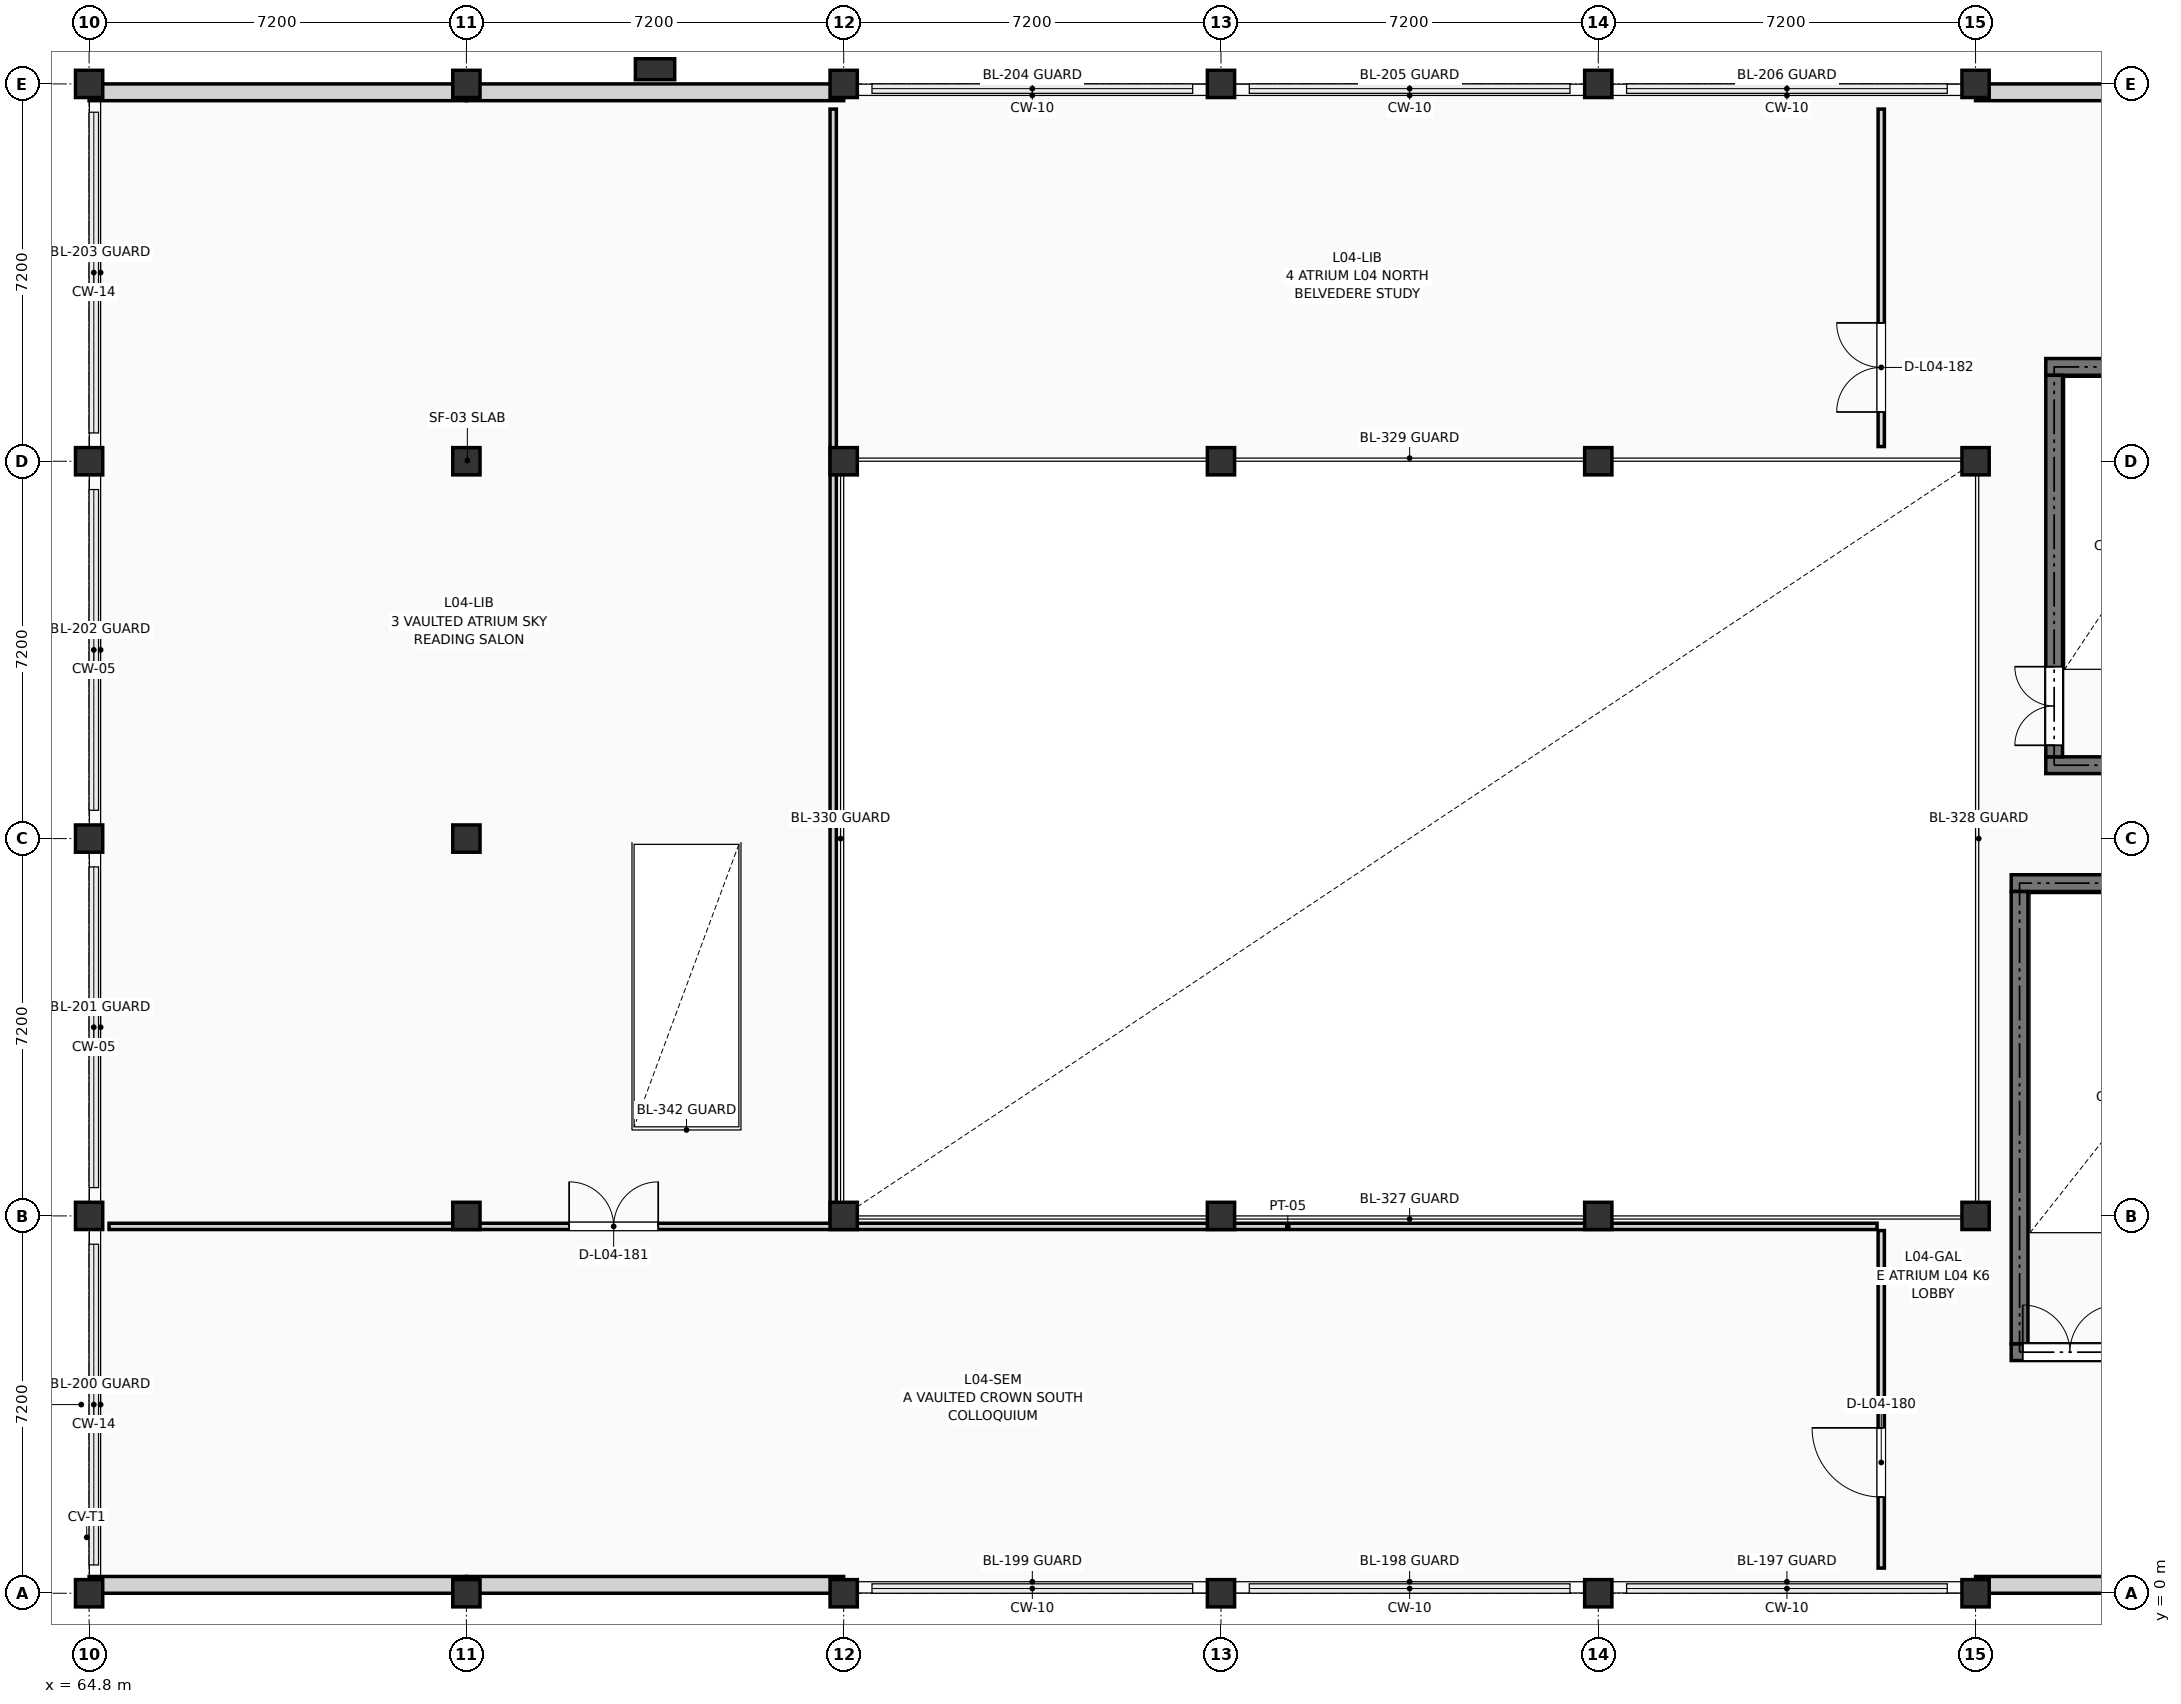
"""IFC4 building model, lengths in metres.
Left out: names, types, materials, properties, quantities, classifications, styles, units other than length and angle.
Written with IfcOpenShell. Run it as: python <this file> out.ifc"""

import sys

from ifc_helpers import new_model, si_unit, direction, frame, frame_2d, origin, origin_2d, place, context, subcontext, project, spatial, rectangle, extrude, element, fill, save


model = new_model("IFC4")
c1 = context("Model", 3, precision=1e-05, world=origin(), true_north=direction((0.0, 1.0)))
c2 = subcontext(c1, "Body", "Model", "MODEL_VIEW")
j1 = project(units=[si_unit("LENGTHUNIT", "METRE"), si_unit("PLANEANGLEUNIT", "RADIAN")], contexts=[c1])
p1 = place(None, origin())
s1 = spatial("IfcSite", under=j1, at=p1, CompositionType="ELEMENT")
p2 = place(p1, origin())
s2 = spatial("IfcBuilding", under=s1, at=p2, CompositionType="ELEMENT")
p3 = place(p2, frame((0.0, 0.0, 15.75)))
s3 = spatial("IfcBuildingStorey", under=s2, at=p3, CompositionType="ELEMENT", Elevation=15.75)
for number, where, z_axis, x_axis in (
    (1, (64.8, 0.0, 0.0), (0.0, 0.0, 1.0), (1.0, 0.0, 0.0)),
    (2, (64.8, 7.2, 0.0), (0.0, 0.0, 1.0), (1.0, 0.0, 0.0)),
    (3, (64.8, 14.4, 0.0), (0.0, 0.0, 1.0), (1.0, 0.0, 0.0)),
    (4, (64.8, 21.6, 0.0), (0.0, 0.0, 1.0), (1.0, 0.0, 0.0)),
    (5, (64.8, 28.8, 0.0), (0.0, 0.0, 1.0), (1.0, 0.0, 0.0)),
    (6, (72.0, 0.0, 0.0), (0.0, 0.0, 1.0), (1.0, 0.0, 0.0)),
    (7, (72.0, 7.2, 0.0), (0.0, 0.0, 1.0), (1.0, 0.0, 0.0)),
    (8, (72.0, 14.4, 0.0), (0.0, 0.0, 1.0), (1.0, 0.0, 0.0)),
    (9, (72.0, 21.6, 0.0), (0.0, 0.0, 1.0), (1.0, 0.0, 0.0)),
    (10, (72.0, 28.8, 0.0), (0.0, 0.0, 1.0), (1.0, 0.0, 0.0)),
    (11, (79.2, 0.0, 0.0), (0.0, 0.0, 1.0), (1.0, 0.0, 0.0)),
    (12, (79.2, 7.2, 0.0), (0.0, 0.0, 1.0), (1.0, 0.0, 0.0)),
    (13, (79.2, 21.6, 0.0), (0.0, 0.0, 1.0), (1.0, 0.0, 0.0)),
    (14, (79.2, 28.8, 0.0), (0.0, 0.0, 1.0), (1.0, 0.0, 0.0)),
    (15, (86.4, 0.0, 0.0), (0.0, 0.0, 1.0), (1.0, 0.0, 0.0)),
    (16, (86.4, 7.2, 0.0), (0.0, 0.0, 1.0), (1.0, 0.0, 0.0)),
    (17, (86.4, 21.6, 0.0), (0.0, 0.0, 1.0), (1.0, 0.0, 0.0)),
    (18, (86.4, 28.8, 0.0), (0.0, 0.0, 1.0), (1.0, 0.0, 0.0)),
    (19, (93.6, 0.0, 0.0), (0.0, 0.0, 1.0), (1.0, 0.0, 0.0)),
    (20, (93.6, 7.2, 0.0), (0.0, 0.0, 1.0), (1.0, 0.0, 0.0)),
    (21, (93.6, 21.6, 0.0), (0.0, 0.0, 1.0), (1.0, 0.0, 0.0)),
    (22, (93.6, 28.8, 0.0), (0.0, 0.0, 1.0), (1.0, 0.0, 0.0)),
    (23, (100.8, 0.0, 0.0), (0.0, 0.0, 1.0), (1.0, 0.0, 0.0)),
    (24, (100.8, 7.2, 0.0), (0.0, 0.0, 1.0), (1.0, 0.0, 0.0)),
    (25, (100.8, 21.6, 0.0), (0.0, 0.0, 1.0), (1.0, 0.0, 0.0)),
    (26, (100.8, 28.8, 0.0), (0.0, 0.0, 1.0), (1.0, 0.0, 0.0)),
):
    element("IfcColumn", number, at=place(p3, frame(where, z_axis=z_axis, x_axis=x_axis)), inside=s3, PredefinedType="COLUMN", context=c2, shape_type="SweptSolid", body=[
        extrude(rectangle(XDim=0.52, YDim=0.52, at=origin_2d()), origin(), (0.0, 0.0, 1.0), 3.6),
    ])
p4 = place(p3, frame((75.6, 29.08, 0.0), z_axis=(0.0, 0.0, 1.0), x_axis=(0.0, 1.0, 0.0)))
e27 = element("IfcColumn", 27, at=p4, inside=s3, PredefinedType="PILASTER", context=c2, shape_type="SweptSolid", body=[
    extrude(rectangle(XDim=0.4, YDim=0.75, at=origin_2d()), origin(), (0.0, 0.0, 1.0), 3.6),
])
for number, where, z_axis, x_axis in (
    (28, (100.8, 0.16, 0.0), (0.0, 0.0, 1.0), (1.0, 0.0, 0.0)),
    (29, (72.0, 0.16, 0.0), (0.0, 0.0, 1.0), (1.0, 0.0, 0.0)),
    (30, (64.8, 0.16, 0.0), (0.0, 0.0, 1.0), (1.0, 0.0, 0.0)),
    (31, (64.8, 28.64, 0.0), (0.0, 0.0, 1.0), (1.0, 0.0, 0.0)),
    (32, (72.0, 28.64, 0.0), (0.0, 0.0, 1.0), (1.0, 0.0, 0.0)),
    (33, (100.8, 28.64, 0.0), (0.0, 0.0, 1.0), (1.0, 0.0, 0.0)),
):
    element("IfcWall", number, at=place(p3, frame(where, z_axis=z_axis, x_axis=x_axis)), inside=s3, PredefinedType="SOLIDWALL", context=c2, shape_type="SweptSolid", body=[
        extrude(rectangle(XDim=7.2, YDim=0.32, at=frame_2d((3.6, 0.0))), origin(), (0.0, 0.0, 1.0), 2.84),
    ])
for number, where, z_axis, x_axis in (
    (34, (102.14, 15.8, 0.0), (0.0, 0.0, 1.0), (1.0, 0.0, 0.0)),
    (35, (102.14, 23.4, 0.0), (0.0, 0.0, 1.0), (1.0, 0.0, 0.0)),
):
    element("IfcWall", number, at=place(p3, frame(where, z_axis=z_axis, x_axis=x_axis)), inside=s3, PredefinedType="SHEAR", context=c2, shape_type="SweptSolid", body=[
        extrude(rectangle(XDim=4.44, YDim=0.32, at=frame_2d((2.22, 0.0))), origin(), (0.0, 0.0, 1.0), 3.39),
    ])
p5 = place(p3, frame((102.3, 15.96, 0.0), z_axis=(0.0, 0.0, 1.0), x_axis=(0.0, 1.0, 0.0)))
e36 = element("IfcWall", 36, at=p5, inside=s3, PredefinedType="SHEAR", context=c2, shape_type="SweptSolid", body=[
    extrude(rectangle(XDim=7.28, YDim=0.32, at=frame_2d((3.64, 0.0))), origin(), (0.0, 0.0, 1.0), 3.39),
])
p6 = place(p5, frame((0.22, 0.0, 0.0)))
e37 = element("IfcOpeningElement", 37, at=p6, cuts=e36, PredefinedType="OPENING", context=c2, shape_type="SweptSolid", body=[
    extrude(rectangle(XDim=1.5, YDim=2.2, at=frame_2d((0.75, 1.1))), frame((0.0, 0.172, 0.0), z_axis=(0.0, -1.0, 0.0), x_axis=(1.0, 0.0, 0.0)), (0.0, 0.0, 1.0), 0.344),
])
p7 = place(p3, frame((101.48, 4.6, 0.0), z_axis=(0.0, 0.0, 1.0), x_axis=(1.0, 0.0, 0.0)))
e38 = element("IfcWall", 38, at=p7, inside=s3, PredefinedType="SHEAR", context=c2, shape_type="SweptSolid", body=[
    extrude(rectangle(XDim=5.84, YDim=0.32, at=frame_2d((2.92, 0.0))), origin(), (0.0, 0.0, 1.0), 3.39),
])
p8 = place(p7, frame((0.22, 0.0, 0.0)))
e39 = element("IfcOpeningElement", 39, at=p8, cuts=e38, PredefinedType="OPENING", context=c2, shape_type="SweptSolid", body=[
    extrude(rectangle(XDim=1.8, YDim=2.2, at=frame_2d((0.9, 1.1))), frame((0.0, 0.172, 0.0), z_axis=(0.0, -1.0, 0.0), x_axis=(1.0, 0.0, 0.0)), (0.0, 0.0, 1.0), 0.344),
])
p9 = place(p3, frame((101.48, 13.55, 0.0), z_axis=(0.0, 0.0, 1.0), x_axis=(1.0, 0.0, 0.0)))
e40 = element("IfcWall", 40, at=p9, inside=s3, PredefinedType="SHEAR", context=c2, shape_type="SweptSolid", body=[
    extrude(rectangle(XDim=5.84, YDim=0.32, at=frame_2d((2.92, 0.0))), origin(), (0.0, 0.0, 1.0), 3.39),
])
p10 = place(p3, frame((101.64, 4.76, 0.0), z_axis=(0.0, 0.0, 1.0), x_axis=(0.0, 1.0, 0.0)))
e41 = element("IfcWall", 41, at=p10, inside=s3, PredefinedType="SHEAR", context=c2, shape_type="SweptSolid", body=[
    extrude(rectangle(XDim=8.63, YDim=0.32, at=frame_2d((4.315, 0.0))), origin(), (0.0, 0.0, 1.0), 3.39),
])
p11 = place(p3, frame((99.0, 0.48, 0.0), z_axis=(0.0, 0.0, 1.0), x_axis=(0.0, 1.0, 0.0)))
e42 = element("IfcWall", 42, at=p11, inside=s3, PredefinedType="PARTITIONING", context=c2, shape_type="SweptSolid", body=[
    extrude(rectangle(XDim=6.44, YDim=0.12, at=frame_2d((3.22, 0.0))), origin(), (0.0, 0.0, 1.0), 3.375),
])
p12 = place(p11, frame((1.356, 0.0, 0.0)))
e43 = element("IfcOpeningElement", 43, at=p12, cuts=e42, PredefinedType="OPENING", context=c2, shape_type="SweptSolid", body=[
    extrude(rectangle(XDim=1.32, YDim=2.2, at=frame_2d((0.66, 1.1))), frame((0.0, 0.072, 0.0), z_axis=(0.0, -1.0, 0.0), x_axis=(1.0, 0.0, 0.0)), (0.0, 0.0, 1.0), 0.144),
])
p13 = place(p3, frame((65.18, 7.0, 0.0), z_axis=(0.0, 0.0, 1.0), x_axis=(1.0, 0.0, 0.0)))
e44 = element("IfcWall", 44, at=p13, inside=s3, PredefinedType="PARTITIONING", context=c2, shape_type="SweptSolid", body=[
    extrude(rectangle(XDim=33.74, YDim=0.12, at=frame_2d((16.87, 0.0))), origin(), (0.0, 0.0, 1.0), 2.655),
])
p14 = place(p13, frame((8.781, 0.0, 0.0)))
e45 = element("IfcOpeningElement", 45, at=p14, cuts=e44, PredefinedType="OPENING", context=c2, shape_type="SweptSolid", body=[
    extrude(rectangle(XDim=1.7, YDim=2.28, at=frame_2d((0.85, 1.14))), frame((0.0, 0.072, 0.0), z_axis=(0.0, -1.0, 0.0), x_axis=(1.0, 0.0, 0.0)), (0.0, 0.0, 1.0), 0.144),
])
p15 = place(p3, frame((79.0, 7.1, 0.0), z_axis=(0.0, 0.0, 1.0), x_axis=(0.0, 1.0, 0.0)))
e46 = element("IfcWall", 46, at=p15, inside=s3, PredefinedType="PARTITIONING", context=c2, shape_type="SweptSolid", body=[
    extrude(rectangle(XDim=21.22, YDim=0.12, at=frame_2d((10.61, 0.0))), origin(), (0.0, 0.0, 1.0), 2.655),
])
p16 = place(p3, frame((99.0, 21.88, 0.0), z_axis=(0.0, 0.0, 1.0), x_axis=(0.0, 1.0, 0.0)))
e47 = element("IfcWall", 47, at=p16, inside=s3, PredefinedType="PARTITIONING", context=c2, shape_type="SweptSolid", body=[
    extrude(rectangle(XDim=6.44, YDim=0.12, at=frame_2d((3.22, 0.0))), origin(), (0.0, 0.0, 1.0), 3.375),
])
p17 = place(p16, frame((0.66, 0.0, 0.0)))
e48 = element("IfcOpeningElement", 48, at=p17, cuts=e47, PredefinedType="OPENING", context=c2, shape_type="SweptSolid", body=[
    extrude(rectangle(XDim=1.7, YDim=2.28, at=frame_2d((0.85, 1.14))), frame((0.0, 0.072, 0.0), z_axis=(0.0, -1.0, 0.0), x_axis=(1.0, 0.0, 0.0)), (0.0, 0.0, 1.0), 0.144),
])
p18 = place(p6, origin())
e49 = element("IfcDoor", 49, at=p18, inside=s3, OperationType="DOUBLE_DOOR_SINGLE_SWING", PredefinedType="DOOR", context=c2, shape_type="SweptSolid", body=[
    extrude(rectangle(XDim=1.5, YDim=2.2, at=frame_2d((0.75, 1.1))), frame((0.0, 0.025, 0.0), z_axis=(0.0, -1.0, 0.0), x_axis=(1.0, 0.0, 0.0)), (0.0, 0.0, 1.0), 0.05),
])
fill(e37, e49)
p19 = place(p8, origin())
e50 = element("IfcDoor", 50, at=p19, inside=s3, OperationType="DOUBLE_DOOR_SINGLE_SWING", PredefinedType="DOOR", context=c2, shape_type="SweptSolid", body=[
    extrude(rectangle(XDim=1.8, YDim=2.2, at=frame_2d((0.9, 1.1))), frame((0.0, 0.025, 0.0), z_axis=(0.0, -1.0, 0.0), x_axis=(1.0, 0.0, 0.0)), (0.0, 0.0, 1.0), 0.05),
])
fill(e39, e50)
p20 = place(p12, origin())
e51 = element("IfcDoor", 51, at=p20, inside=s3, OperationType="SINGLE_SWING_RIGHT", PredefinedType="DOOR", context=c2, shape_type="SweptSolid", body=[
    extrude(rectangle(XDim=1.32, YDim=2.2, at=frame_2d((0.66, 1.1))), frame((0.0, 0.025, 0.0), z_axis=(0.0, -1.0, 0.0), x_axis=(1.0, 0.0, 0.0)), (0.0, 0.0, 1.0), 0.05),
])
fill(e43, e51)
p21 = place(p14, origin())
e52 = element("IfcDoor", 52, at=p21, inside=s3, OperationType="DOUBLE_DOOR_SINGLE_SWING", PredefinedType="DOOR", context=c2, shape_type="SweptSolid", body=[
    extrude(rectangle(XDim=1.7, YDim=2.28, at=frame_2d((0.85, 1.14))), frame((0.0, 0.025, 0.0), z_axis=(0.0, -1.0, 0.0), x_axis=(1.0, 0.0, 0.0)), (0.0, 0.0, 1.0), 0.05),
])
fill(e45, e52)
p22 = place(p17, origin())
e53 = element("IfcDoor", 53, at=p22, inside=s3, OperationType="DOUBLE_DOOR_SINGLE_SWING", PredefinedType="DOOR", context=c2, shape_type="SweptSolid", body=[
    extrude(rectangle(XDim=1.7, YDim=2.28, at=frame_2d((0.85, 1.14))), frame((0.0, 0.025, 0.0), z_axis=(0.0, -1.0, 0.0), x_axis=(1.0, 0.0, 0.0)), (0.0, 0.0, 1.0), 0.05),
])
fill(e48, e53)
save(model, sys.argv[1])
